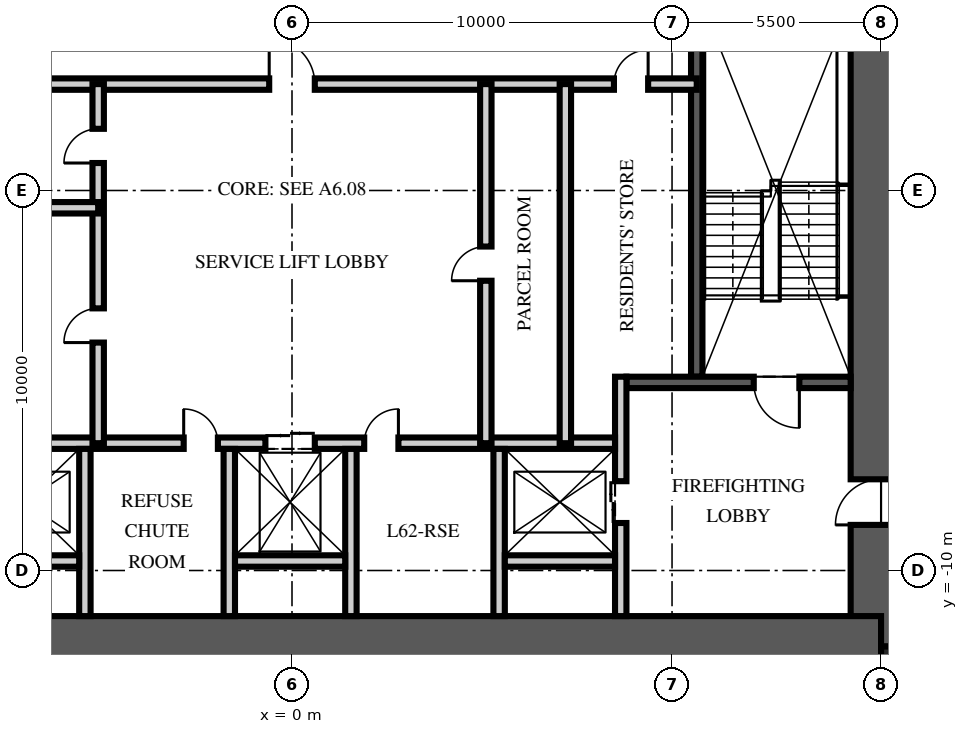
"""IFC4 building model, lengths in metres.
Left out: names, types, materials, properties, quantities, classifications, styles, units other than length and angle.
Written with IfcOpenShell. Run it as: python <this file> out.ifc"""

import sys

from ifc_helpers import new_model, si_unit, direction, frame, frame_2d, origin, origin_2d, place, context, subcontext, project, spatial, rectangle, extrude, element, fill, save


model = new_model("IFC4")
c1 = context("Model", 3, precision=1e-05, world=origin(), true_north=direction((0.0, 1.0)))
c2 = subcontext(c1, "Body", "Model", "MODEL_VIEW")
j1 = project(units=[si_unit("LENGTHUNIT", "METRE"), si_unit("PLANEANGLEUNIT", "RADIAN")], contexts=[c1])
p1 = place(None, origin())
s1 = spatial("IfcSite", under=j1, at=p1, CompositionType="ELEMENT")
p2 = place(p1, origin())
s2 = spatial("IfcBuilding", under=s1, at=p2, CompositionType="ELEMENT")
p3 = place(p2, frame((0.0, 0.0, 248.25)))
s3 = spatial("IfcBuildingStorey", under=s2, at=p3, CompositionType="ELEMENT", Elevation=248.25)
p4 = place(p3, frame((15.5, -12.0, -0.25), z_axis=(0.0, 0.0, 1.0), x_axis=(0.0, 1.0, 0.0)))
e1 = element("IfcWall", 1, at=p4, inside=s3, PredefinedType="SHEAR", context=c2, shape_type="SweptSolid", body=[
    extrude(rectangle(XDim=24.0, YDim=1.6, at=frame_2d((12.0, 0.0))), origin(), (0.0, 0.0, 1.0), 3.75),
])
p5 = place(p4, frame((3.2, 0.0, 0.25)))
e2 = element("IfcOpeningElement", 2, at=p5, cuts=e1, PredefinedType="OPENING", context=c2, shape_type="SweptSolid", body=[
    extrude(rectangle(XDim=1.2, YDim=2.1, at=frame_2d((0.6, 1.05))), frame((0.0, 0.81, 0.0), z_axis=(0.0, -1.0, 0.0), x_axis=(1.0, 0.0, 0.0)), (0.0, 0.0, 1.0), 1.62),
])
p6 = place(p4, frame((19.3, 0.0, 0.25)))
e3 = element("IfcOpeningElement", 3, at=p6, cuts=e1, PredefinedType="OPENING", context=c2, shape_type="SweptSolid", body=[
    extrude(rectangle(XDim=1.8, YDim=2.1, at=frame_2d((0.9, 1.05))), frame((0.0, 0.81, 0.0), z_axis=(0.0, -1.0, 0.0), x_axis=(1.0, 0.0, 0.0)), (0.0, 0.0, 1.0), 1.62),
])
p7 = place(p3, frame((-15.5, -12.0, -0.25), z_axis=(0.0, 0.0, 1.0), x_axis=(1.0, 0.0, 0.0)))
e4 = element("IfcWall", 4, at=p7, inside=s3, PredefinedType="SHEAR", context=c2, shape_type="SweptSolid", body=[
    extrude(rectangle(XDim=31.0, YDim=1.6, at=frame_2d((15.5, 0.0))), origin(), (0.0, 0.0, 1.0), 3.75),
])
p8 = place(p3, frame((15.9, -12.4, -0.25), z_axis=(0.0, 0.0, 1.0), x_axis=(1.0, 0.0, 0.0)))
e5 = element("IfcColumn", 5, at=p8, inside=s3, PredefinedType="COLUMN", context=c2, shape_type="SweptSolid", body=[
    extrude(rectangle(XDim=0.8, YDim=0.8, at=origin_2d()), origin(), (0.0, 0.0, 1.0), 3.75),
])
p9 = place(p3, frame((10.65, -4.9, 0.0), z_axis=(0.0, 0.0, 1.0), x_axis=(0.0, 1.0, 0.0)))
e6 = element("IfcWall", 6, at=p9, inside=s3, PredefinedType="SOLIDWALL", context=c2, shape_type="SweptSolid", body=[
    extrude(rectangle(XDim=10.1, YDim=0.3, at=frame_2d((5.05, 0.0))), origin(), (0.0, 0.0, 1.0), 3.5),
])
p10 = place(p3, frame((14.7, -5.05, 0.0), z_axis=(0.0, 0.0, 1.0), x_axis=(-1.0, 0.0, 0.0)))
e7 = element("IfcWall", 7, at=p10, inside=s3, PredefinedType="SOLIDWALL", context=c2, shape_type="SweptSolid", body=[
    extrude(rectangle(XDim=5.9, YDim=0.3, at=frame_2d((2.95, 0.0))), origin(), (0.0, 0.0, 1.0), 3.5),
])
p11 = place(p10, frame((1.35, 0.0, 0.0)))
e8 = element("IfcOpeningElement", 8, at=p11, cuts=e7, PredefinedType="OPENING", context=c2, shape_type="SweptSolid", body=[
    extrude(rectangle(XDim=1.2, YDim=2.1, at=frame_2d((0.6, 1.05))), frame((0.0, 0.16, 0.0), z_axis=(0.0, -1.0, 0.0), x_axis=(1.0, 0.0, 0.0)), (0.0, 0.0, 1.0), 0.32),
])
p12 = place(p3, frame((8.65, -11.2, 0.0), z_axis=(0.0, 0.0, 1.0), x_axis=(0.0, 1.0, 0.0)))
e9 = element("IfcWall", 9, at=p12, inside=s3, PredefinedType="PARTITIONING", context=c2, shape_type="SweptSolid", body=[
    extrude(rectangle(XDim=6.3, YDim=0.3, at=frame_2d((3.15, 0.0))), origin(), (0.0, 0.0, 1.0), 3.5),
])
p13 = place(p12, frame((2.45, 0.0, 0.0)))
e10 = element("IfcOpeningElement", 10, at=p13, cuts=e9, PredefinedType="OPENING", context=c2, shape_type="SweptSolid", body=[
    extrude(rectangle(XDim=1.1, YDim=2.1, at=frame_2d((0.55, 1.05))), frame((0.0, 0.16, 0.0), z_axis=(0.0, -1.0, 0.0), x_axis=(1.0, 0.0, 0.0)), (0.0, 0.0, 1.0), 0.32),
])
p14 = place(p3, frame((-8.5, -6.65, 0.0), z_axis=(0.0, 0.0, 1.0), x_axis=(1.0, 0.0, 0.0)))
e11 = element("IfcWall", 11, at=p14, inside=s3, PredefinedType="PARTITIONING", context=c2, shape_type="SweptSolid", body=[
    extrude(rectangle(XDim=17.0, YDim=0.3, at=frame_2d((8.5, 0.0))), origin(), (0.0, 0.0, 1.0), 3.5),
])
p15 = place(p14, frame((7.8, 0.0, 0.0)))
e12 = element("IfcOpeningElement", 12, at=p15, cuts=e11, PredefinedType="OPENING", context=c2, shape_type="SweptSolid", body=[
    extrude(rectangle(XDim=1.3, YDim=2.4, at=frame_2d((0.65, 1.2))), frame((0.0, 0.16, 0.0), z_axis=(0.0, -1.0, 0.0), x_axis=(1.0, 0.0, 0.0)), (0.0, 0.0, 1.0), 0.32),
])
p16 = place(p14, frame((5.65, 0.0, 0.0)))
e13 = element("IfcOpeningElement", 13, at=p16, cuts=e11, PredefinedType="OPENING", context=c2, shape_type="SweptSolid", body=[
    extrude(rectangle(XDim=0.9, YDim=2.1, at=frame_2d((0.45, 1.05))), frame((0.0, 0.16, 0.0), z_axis=(0.0, -1.0, 0.0), x_axis=(1.0, 0.0, 0.0)), (0.0, 0.0, 1.0), 0.32),
])
p17 = place(p14, frame((10.4, 0.0, 0.0)))
e14 = element("IfcOpeningElement", 14, at=p17, cuts=e11, PredefinedType="OPENING", context=c2, shape_type="SweptSolid", body=[
    extrude(rectangle(XDim=0.9, YDim=2.1, at=frame_2d((0.45, 1.05))), frame((0.0, 0.16, 0.0), z_axis=(0.0, -1.0, 0.0), x_axis=(1.0, 0.0, 0.0)), (0.0, 0.0, 1.0), 0.32),
])
for number, where, z_axis, x_axis in (
    (15, (-5.45, -11.2, 0.0), (0.0, 0.0, 1.0), (0.0, 1.0, 0.0)),
    (16, (-1.65, -11.2, 0.0), (0.0, 0.0, 1.0), (0.0, 1.0, 0.0)),
    (17, (1.55, -11.2, 0.0), (0.0, 0.0, 1.0), (0.0, 1.0, 0.0)),
    (18, (5.45, -11.2, 0.0), (0.0, 0.0, 1.0), (0.0, 1.0, 0.0)),
):
    element("IfcWall", number, at=place(p3, frame(where, z_axis=z_axis, x_axis=x_axis)), inside=s3, PredefinedType="PARTITIONING", context=c2, shape_type="SweptSolid", body=[
        extrude(rectangle(XDim=4.4, YDim=0.3, at=frame_2d((2.2, 0.0))), origin(), (0.0, 0.0, 1.0), 3.5),
    ])
for number, where, z_axis, x_axis in (
    (19, (-8.5, -9.75, 0.0), (0.0, 0.0, 1.0), (1.0, 0.0, 0.0)),
    (20, (-1.5, -9.75, 0.0), (0.0, 0.0, 1.0), (1.0, 0.0, 0.0)),
    (21, (5.6, -9.75, 0.0), (0.0, 0.0, 1.0), (1.0, 0.0, 0.0)),
):
    element("IfcWall", number, at=place(p3, frame(where, z_axis=z_axis, x_axis=x_axis)), inside=s3, PredefinedType="PARTITIONING", context=c2, shape_type="SweptSolid", body=[
        extrude(rectangle(XDim=2.9, YDim=0.3, at=frame_2d((1.45, 0.0))), origin(), (0.0, 0.0, 1.0), 3.5),
    ])
p18 = place(p3, frame((-10.65, 2.8, 0.0), z_axis=(0.0, 0.0, 1.0), x_axis=(1.0, 0.0, 0.0)))
e22 = element("IfcWall", 22, at=p18, inside=s3, PredefinedType="PARTITIONING", context=c2, shape_type="SweptSolid", body=[
    extrude(rectangle(XDim=21.3, YDim=0.3, at=frame_2d((10.65, 0.0))), origin(), (0.0, 0.0, 1.0), 3.5),
])
p19 = place(p18, frame((10.05, 0.0, 0.0)))
e23 = element("IfcOpeningElement", 23, at=p19, cuts=e22, PredefinedType="OPENING", context=c2, shape_type="SweptSolid", body=[
    extrude(rectangle(XDim=1.2, YDim=2.1, at=frame_2d((0.6, 1.05))), frame((0.0, 0.16, 0.0), z_axis=(0.0, -1.0, 0.0), x_axis=(1.0, 0.0, 0.0)), (0.0, 0.0, 1.0), 0.32),
])
p20 = place(p18, frame((19.121, 0.0, 0.0)))
e24 = element("IfcOpeningElement", 24, at=p20, cuts=e22, PredefinedType="OPENING", context=c2, shape_type="SweptSolid", body=[
    extrude(rectangle(XDim=0.9, YDim=2.1, at=frame_2d((0.45, 1.05))), frame((0.0, 0.16, 0.0), z_axis=(0.0, -1.0, 0.0), x_axis=(1.0, 0.0, 0.0)), (0.0, 0.0, 1.0), 0.32),
])
p21 = place(p3, frame((-5.1, -6.65, 0.0), z_axis=(0.0, 0.0, 1.0), x_axis=(0.0, 1.0, 0.0)))
e25 = element("IfcWall", 25, at=p21, inside=s3, PredefinedType="PARTITIONING", context=c2, shape_type="SweptSolid", body=[
    extrude(rectangle(XDim=9.45, YDim=0.3, at=frame_2d((4.725, 0.0))), origin(), (0.0, 0.0, 1.0), 3.5),
])
p22 = place(p21, frame((2.648, 0.0, 0.0)))
e26 = element("IfcOpeningElement", 26, at=p22, cuts=e25, PredefinedType="OPENING", context=c2, shape_type="SweptSolid", body=[
    extrude(rectangle(XDim=0.9, YDim=2.1, at=frame_2d((0.45, 1.05))), frame((0.0, 0.16, 0.0), z_axis=(0.0, -1.0, 0.0), x_axis=(1.0, 0.0, 0.0)), (0.0, 0.0, 1.0), 0.32),
])
p23 = place(p21, frame((7.373, 0.0, 0.0)))
e27 = element("IfcOpeningElement", 27, at=p23, cuts=e25, PredefinedType="OPENING", context=c2, shape_type="SweptSolid", body=[
    extrude(rectangle(XDim=0.9, YDim=2.1, at=frame_2d((0.45, 1.05))), frame((0.0, 0.16, 0.0), z_axis=(0.0, -1.0, 0.0), x_axis=(1.0, 0.0, 0.0)), (0.0, 0.0, 1.0), 0.32),
])
p24 = place(p3, frame((5.1, -6.65, 0.0), z_axis=(0.0, 0.0, 1.0), x_axis=(0.0, 1.0, 0.0)))
e28 = element("IfcWall", 28, at=p24, inside=s3, PredefinedType="PARTITIONING", context=c2, shape_type="SweptSolid", body=[
    extrude(rectangle(XDim=9.45, YDim=0.3, at=frame_2d((4.725, 0.0))), origin(), (0.0, 0.0, 1.0), 3.5),
])
p25 = place(p24, frame((4.275, 0.0, 0.0)))
e29 = element("IfcOpeningElement", 29, at=p25, cuts=e28, PredefinedType="OPENING", context=c2, shape_type="SweptSolid", body=[
    extrude(rectangle(XDim=0.9, YDim=2.1, at=frame_2d((0.45, 1.05))), frame((0.0, 0.16, 0.0), z_axis=(0.0, -1.0, 0.0), x_axis=(1.0, 0.0, 0.0)), (0.0, 0.0, 1.0), 0.32),
])
p26 = place(p3, frame((-10.65, -0.455, 0.0), z_axis=(0.0, 0.0, 1.0), x_axis=(1.0, 0.0, 0.0)))
e30 = element("IfcWall", 30, at=p26, inside=s3, PredefinedType="PARTITIONING", context=c2, shape_type="SweptSolid", body=[
    extrude(rectangle(XDim=5.55, YDim=0.3, at=frame_2d((2.775, 0.0))), origin(), (0.0, 0.0, 1.0), 3.5),
])
p27 = place(p3, frame((7.193, -6.65, 0.0), z_axis=(0.0, 0.0, 1.0), x_axis=(0.0, 1.0, 0.0)))
e31 = element("IfcWall", 31, at=p27, inside=s3, PredefinedType="PARTITIONING", context=c2, shape_type="SweptSolid", body=[
    extrude(rectangle(XDim=9.45, YDim=0.3, at=frame_2d((4.725, 0.0))), origin(), (0.0, 0.0, 1.0), 3.5),
])
p28 = place(p11, origin())
e32 = element("IfcDoor", 32, at=p28, inside=s3, OperationType="SINGLE_SWING_LEFT", PredefinedType="DOOR", context=c2, shape_type="SweptSolid", body=[
    extrude(rectangle(XDim=1.2, YDim=2.1, at=frame_2d((0.6, 1.05))), frame((0.0, 0.025, 0.0), z_axis=(0.0, -1.0, 0.0), x_axis=(1.0, 0.0, 0.0)), (0.0, 0.0, 1.0), 0.05),
])
fill(e8, e32)
p29 = place(p5, origin())
e33 = element("IfcDoor", 33, at=p29, inside=s3, OperationType="SINGLE_SWING_LEFT", PredefinedType="DOOR", context=c2, shape_type="SweptSolid", body=[
    extrude(rectangle(XDim=1.2, YDim=2.1, at=frame_2d((0.6, 1.05))), frame((0.0, 0.025, 0.0), z_axis=(0.0, -1.0, 0.0), x_axis=(1.0, 0.0, 0.0)), (0.0, 0.0, 1.0), 0.05),
])
fill(e2, e33)
p30 = place(p13, origin())
e34 = element("IfcDoor", 34, at=p30, inside=s3, OperationType="DOUBLE_DOOR_SLIDING", PredefinedType="DOOR", context=c2, shape_type="SweptSolid", body=[
    extrude(rectangle(XDim=1.1, YDim=2.1, at=frame_2d((0.55, 1.05))), frame((0.0, 0.025, 0.0), z_axis=(0.0, -1.0, 0.0), x_axis=(1.0, 0.0, 0.0)), (0.0, 0.0, 1.0), 0.05),
])
fill(e10, e34)
p31 = place(p15, origin())
e35 = element("IfcDoor", 35, at=p31, inside=s3, OperationType="DOUBLE_DOOR_SLIDING", PredefinedType="DOOR", context=c2, shape_type="SweptSolid", body=[
    extrude(rectangle(XDim=1.3, YDim=2.4, at=frame_2d((0.65, 1.2))), frame((0.0, 0.025, 0.0), z_axis=(0.0, -1.0, 0.0), x_axis=(1.0, 0.0, 0.0)), (0.0, 0.0, 1.0), 0.05),
])
fill(e12, e35)
p32 = place(p19, origin())
e36 = element("IfcDoor", 36, at=p32, inside=s3, OperationType="SINGLE_SWING_LEFT", PredefinedType="DOOR", context=c2, shape_type="SweptSolid", body=[
    extrude(rectangle(XDim=1.2, YDim=2.1, at=frame_2d((0.6, 1.05))), frame((0.0, 0.025, 0.0), z_axis=(0.0, -1.0, 0.0), x_axis=(1.0, 0.0, 0.0)), (0.0, 0.0, 1.0), 0.05),
])
fill(e23, e36)
p33 = place(p16, origin())
e37 = element("IfcDoor", 37, at=p33, inside=s3, OperationType="SINGLE_SWING_LEFT", PredefinedType="DOOR", context=c2, shape_type="SweptSolid", body=[
    extrude(rectangle(XDim=0.9, YDim=2.1, at=frame_2d((0.45, 1.05))), frame((0.0, 0.025, 0.0), z_axis=(0.0, -1.0, 0.0), x_axis=(1.0, 0.0, 0.0)), (0.0, 0.0, 1.0), 0.05),
])
fill(e13, e37)
p34 = place(p17, origin())
e38 = element("IfcDoor", 38, at=p34, inside=s3, OperationType="SINGLE_SWING_RIGHT", PredefinedType="DOOR", context=c2, shape_type="SweptSolid", body=[
    extrude(rectangle(XDim=0.9, YDim=2.1, at=frame_2d((0.45, 1.05))), frame((0.0, 0.025, 0.0), z_axis=(0.0, -1.0, 0.0), x_axis=(1.0, 0.0, 0.0)), (0.0, 0.0, 1.0), 0.05),
])
fill(e14, e38)
p35 = place(p22, origin())
e39 = element("IfcDoor", 39, at=p35, inside=s3, OperationType="SINGLE_SWING_LEFT", PredefinedType="DOOR", context=c2, shape_type="SweptSolid", body=[
    extrude(rectangle(XDim=0.9, YDim=2.1, at=frame_2d((0.45, 1.05))), frame((0.0, 0.025, 0.0), z_axis=(0.0, -1.0, 0.0), x_axis=(1.0, 0.0, 0.0)), (0.0, 0.0, 1.0), 0.05),
])
fill(e26, e39)
p36 = place(p23, origin())
e40 = element("IfcDoor", 40, at=p36, inside=s3, OperationType="SINGLE_SWING_LEFT", PredefinedType="DOOR", context=c2, shape_type="SweptSolid", body=[
    extrude(rectangle(XDim=0.9, YDim=2.1, at=frame_2d((0.45, 1.05))), frame((0.0, 0.025, 0.0), z_axis=(0.0, -1.0, 0.0), x_axis=(1.0, 0.0, 0.0)), (0.0, 0.0, 1.0), 0.05),
])
fill(e27, e40)
p37 = place(p25, origin())
e41 = element("IfcDoor", 41, at=p37, inside=s3, OperationType="SINGLE_SWING_LEFT", PredefinedType="DOOR", context=c2, shape_type="SweptSolid", body=[
    extrude(rectangle(XDim=0.9, YDim=2.1, at=frame_2d((0.45, 1.05))), frame((0.0, 0.025, 0.0), z_axis=(0.0, -1.0, 0.0), x_axis=(1.0, 0.0, 0.0)), (0.0, 0.0, 1.0), 0.05),
])
fill(e29, e41)
p38 = place(p20, origin())
e42 = element("IfcDoor", 42, at=p38, inside=s3, OperationType="SINGLE_SWING_RIGHT", PredefinedType="DOOR", context=c2, shape_type="SweptSolid", body=[
    extrude(rectangle(XDim=0.9, YDim=2.1, at=frame_2d((0.45, 1.05))), frame((0.0, 0.025, 0.0), z_axis=(0.0, -1.0, 0.0), x_axis=(1.0, 0.0, 0.0)), (0.0, 0.0, 1.0), 0.05),
])
fill(e24, e42)
save(model, sys.argv[1])
